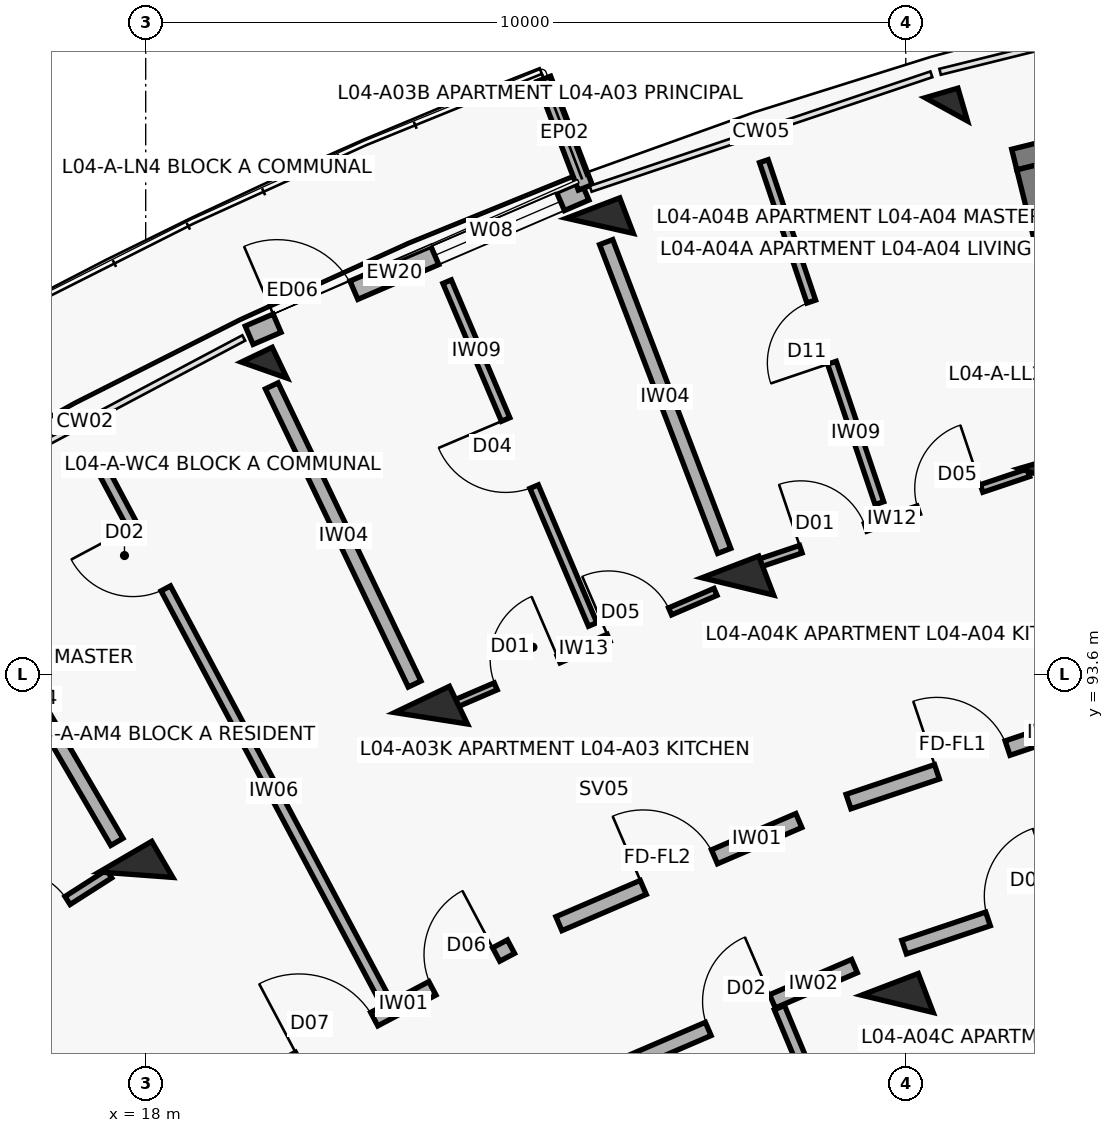
"""IFC4 building model, lengths in metres.
Left out: names, types, materials, properties, quantities, classifications, styles, units other than length and angle.
Written with IfcOpenShell. Run it as: python <this file> out.ifc"""

import sys

from ifc_helpers import new_model, si_unit, direction, frame, frame_2d, origin, origin_2d, place, context, subcontext, project, spatial, rectangle, extrude, element, fill, save


model = new_model("IFC4")
c1 = context("Model", 3, precision=1e-05, world=origin(), true_north=direction((0.0, 1.0)))
c2 = subcontext(c1, "Body", "Model", "MODEL_VIEW")
j1 = project(units=[si_unit("LENGTHUNIT", "METRE"), si_unit("PLANEANGLEUNIT", "RADIAN")], contexts=[c1])
p1 = place(None, origin())
s1 = spatial("IfcSite", under=j1, at=p1, CompositionType="ELEMENT")
p2 = place(p1, origin())
s2 = spatial("IfcBuilding", under=s1, at=p2, CompositionType="ELEMENT")
p3 = place(p2, frame((0.0, 0.0, 14.3)))
s3 = spatial("IfcBuildingStorey", under=s2, at=p3, CompositionType="ELEMENT", Elevation=14.3)
for number, where, z_axis, x_axis in (
    (1, (17.873, 90.96, 0.0), (0.0, 0.0, 1.0), (-0.504, 0.864, 0.0)),
    (2, (21.754, 93.019, 0.0), (0.0, 0.0, 1.0), (-0.432, 0.902, 0.0)),
):
    element("IfcColumn", number, at=place(p3, frame(where, z_axis=z_axis, x_axis=x_axis)), inside=s3, PredefinedType="COLUMN", context=c2, shape_type="SweptSolid", body=[
        extrude(rectangle(XDim=0.55, YDim=0.8, at=origin_2d()), origin(), (0.0, 0.0, 1.0), 3.1),
    ])
p4 = place(p3, frame((19.559, 97.6, 0.0), z_axis=(0.0, 0.0, 1.0), x_axis=(-0.432085748802, 0.901832526405, 0.0)))
e3 = element("IfcColumn", 3, at=p4, inside=s3, PredefinedType="COLUMN", context=c2, shape_type="SweptSolid", body=[
    extrude(rectangle(XDim=0.45, YDim=0.45, at=origin_2d()), origin(), (0.0, 0.0, 1.0), 3.1),
])
for number, where, z_axis, x_axis in (
    (4, (27.889, 89.261, 0.0), (0.0, 0.0, 1.0), (-0.357, 0.934, 0.0)),
    (5, (25.79, 94.753, 0.0), (0.0, 0.0, 1.0), (-0.357, 0.934, 0.0)),
):
    element("IfcColumn", number, at=place(p3, frame(where, z_axis=z_axis, x_axis=x_axis)), inside=s3, PredefinedType="COLUMN", context=c2, shape_type="SweptSolid", body=[
        extrude(rectangle(XDim=0.55, YDim=0.8, at=origin_2d()), origin(), (0.0, 0.0, 1.0), 3.1),
    ])
p5 = place(p3, frame((23.976, 99.499, 0.0), z_axis=(0.0, 0.0, 1.0), x_axis=(-0.357064076459, 0.934079892355, 0.0)))
e6 = element("IfcColumn", 6, at=p5, inside=s3, PredefinedType="COLUMN", context=c2, shape_type="SweptSolid", body=[
    extrude(rectangle(XDim=0.5, YDim=0.75, at=origin_2d()), origin(), (0.0, 0.0, 1.0), 3.1),
])
p6 = place(p3, frame((29.954, 96.153, 0.0), z_axis=(0.0, 0.0, 1.0), x_axis=(-0.27966144946, 0.96009867914, 0.0)))
e7 = element("IfcColumn", 7, at=p6, inside=s3, PredefinedType="COLUMN", context=c2, shape_type="SweptSolid", body=[
    extrude(rectangle(XDim=0.55, YDim=0.8, at=origin_2d()), origin(), (0.0, 0.0, 1.0), 3.1),
])
p7 = place(p3, frame((28.533, 101.031, 0.0), z_axis=(0.0, 0.0, 1.0), x_axis=(-0.27966144946, 0.96009867914, 0.0)))
e8 = element("IfcColumn", 8, at=p7, inside=s3, PredefinedType="COLUMN", context=c2, shape_type="SweptSolid", body=[
    extrude(rectangle(XDim=0.45, YDim=0.45, at=origin_2d()), origin(), (0.0, 0.0, 1.0), 3.1),
])
p8 = place(p3, frame((19.361, 98.059, 0.0), z_axis=(0.0, 0.0, 1.0), x_axis=(0.918711189033, 0.394930058548, 0.0)))
e9 = element("IfcWall", 9, at=p8, inside=s3, PredefinedType="SOLIDWALL", context=c2, shape_type="SweptSolid", body=[
    extrude(rectangle(XDim=4.809, YDim=0.262, at=frame_2d((2.404, 0.0))), origin(), (0.0, 0.0, 1.0), 2.25),
])
p9 = place(p8, frame((0.4, 0.0, 0.0)))
e10 = element("IfcOpeningElement", 10, at=p9, cuts=e9, PredefinedType="OPENING", context=c2, shape_type="SweptSolid", body=[
    extrude(rectangle(XDim=1.1, YDim=2.15, at=frame_2d((0.55, 1.075))), frame((0.0, 0.141, 0.0), z_axis=(0.0, -1.0, 0.0), x_axis=(1.0, 0.0, 0.0)), (0.0, 0.0, 1.0), 0.282),
])
p10 = place(p8, frame((2.659, 0.0, 0.35)))
e11 = element("IfcOpeningElement", 11, at=p10, cuts=e9, PredefinedType="OPENING", context=c2, shape_type="SweptSolid", body=[
    extrude(rectangle(XDim=1.8, YDim=1.65, at=frame_2d((0.9, 0.825))), frame((0.0, 0.141, 0.0), z_axis=(0.0, -1.0, 0.0), x_axis=(1.0, 0.0, 0.0)), (0.0, 0.0, 1.0), 0.282),
])
p11 = place(p3, frame((23.783, 100.003, 0.0), z_axis=(0.0, 0.0, 1.0), x_axis=(-0.356957296461, 0.934120703391, 0.0)))
e12 = element("IfcWall", 12, at=p11, inside=s3, PredefinedType="PARAPET", context=c2, shape_type="SweptSolid", body=[
    extrude(rectangle(XDim=1.53, YDim=0.195, at=frame_2d((0.765, 0.0))), origin(), (0.0, 0.0, 1.0), 2.25),
])
p12 = place(p3, frame((32.718, 101.185, 0.0), z_axis=(0.0, 0.0, 1.0), x_axis=(-0.970711699588, -0.240247364777, 0.0)))
e13 = element("IfcWall", 13, at=p12, inside=s3, PredefinedType="SHEAR", context=c2, shape_type="SweptSolid", body=[
    extrude(rectangle(XDim=3.39, YDim=0.28, at=frame_2d((1.695, 0.0))), origin(), (0.0, 0.0, 1.0), 3.1),
])
p13 = place(p3, frame((30.085, 98.297, 0.0), z_axis=(0.0, 0.0, 1.0), x_axis=(-0.2402993748, 0.970698825832, 0.0)))
e14 = element("IfcWall", 14, at=p13, inside=s3, PredefinedType="SHEAR", context=c2, shape_type="SweptSolid", body=[
    extrude(rectangle(XDim=2.03, YDim=0.28, at=frame_2d((1.015, 0.0))), origin(), (0.0, 0.0, 1.0), 3.1),
])
p14 = place(p3, frame((14.311, 88.917, 0.0), z_axis=(0.0, 0.0, 1.0), x_axis=(0.842238809758, 0.53910461632, 0.0)))
e15 = element("IfcWall", 15, at=p14, inside=s3, PredefinedType="PARTITIONING", context=c2, shape_type="SweptSolid", body=[
    extrude(rectangle(XDim=3.81, YDim=0.125, at=frame_2d((1.905, 0.0))), origin(), (0.0, 0.0, 1.0), 2.08),
])
p15 = place(p14, frame((0.65, 0.0, 0.0)))
e16 = element("IfcOpeningElement", 16, at=p15, cuts=e15, PredefinedType="OPENING", context=c2, shape_type="SweptSolid", body=[
    extrude(rectangle(XDim=0.9, YDim=2.1, at=frame_2d((0.45, 1.05))), frame((0.0, 0.073, 0.0), z_axis=(0.0, -1.0, 0.0), x_axis=(1.0, 0.0, 0.0)), (0.0, 0.0, 1.0), 0.145),
])
p16 = place(p14, frame((2.28, 0.0, 0.0)))
e17 = element("IfcOpeningElement", 17, at=p16, cuts=e15, PredefinedType="OPENING", context=c2, shape_type="SweptSolid", body=[
    extrude(rectangle(XDim=0.88, YDim=2.1, at=frame_2d((0.44, 1.05))), frame((0.0, 0.073, 0.0), z_axis=(0.0, -1.0, 0.0), x_axis=(1.0, 0.0, 0.0)), (0.0, 0.0, 1.0), 0.145),
])
p17 = place(p3, frame((19.77, 88.404, 0.0), z_axis=(0.0, 0.0, 1.0), x_axis=(0.883410853063, 0.468599258099, 0.0)))
e18 = element("IfcWall", 18, at=p17, inside=s3, PredefinedType="SOLIDWALL", context=c2, shape_type="SweptSolid", body=[
    extrude(rectangle(XDim=3.436, YDim=0.2, at=frame_2d((1.718, 0.0))), origin(), (0.0, 0.0, 1.0), 2.08),
])
p18 = place(p17, frame((0.28, 0.0, 0.0)))
e19 = element("IfcOpeningElement", 19, at=p18, cuts=e18, PredefinedType="OPENING", context=c2, shape_type="SweptSolid", body=[
    extrude(rectangle(XDim=1.12, YDim=2.15, at=frame_2d((0.56, 1.075))), frame((0.0, 0.11, 0.0), z_axis=(0.0, -1.0, 0.0), x_axis=(1.0, 0.0, 0.0)), (0.0, 0.0, 1.0), 0.22),
])
p19 = place(p17, frame((2.266, 0.0, 0.0)))
e20 = element("IfcOpeningElement", 20, at=p19, cuts=e18, PredefinedType="OPENING", context=c2, shape_type="SweptSolid", body=[
    extrude(rectangle(XDim=0.95, YDim=2.1, at=frame_2d((0.475, 1.05))), frame((0.0, 0.11, 0.0), z_axis=(0.0, -1.0, 0.0), x_axis=(1.0, 0.0, 0.0)), (0.0, 0.0, 1.0), 0.22),
])
p20 = place(p3, frame((21.107, 89.387, 0.0), z_axis=(0.0, 0.0, 1.0), x_axis=(-0.469891538074, 0.882724159886, 0.0)))
e21 = element("IfcWall", 21, at=p20, inside=s3, PredefinedType="PARTITIONING", context=c2, shape_type="SweptSolid", body=[
    extrude(rectangle(XDim=7.95, YDim=0.14, at=frame_2d((3.975, 0.0))), origin(), (0.0, 0.0, 1.0), 2.08),
])
p21 = place(p20, frame((6.05, 0.0, 0.0)))
e22 = element("IfcOpeningElement", 22, at=p21, cuts=e21, PredefinedType="OPENING", context=c2, shape_type="SweptSolid", body=[
    extrude(rectangle(XDim=0.92, YDim=2.1, at=frame_2d((0.46, 1.05))), frame((0.0, 0.08, 0.0), z_axis=(0.0, -1.0, 0.0), x_axis=(1.0, 0.0, 0.0)), (0.0, 0.0, 1.0), 0.16),
])
p22 = place(p3, frame((17.621, 91.392, 0.0), z_axis=(0.0, 0.0, 1.0), x_axis=(-0.504216452091, 0.863577309475, 0.0)))
e23 = element("IfcWall", 23, at=p22, inside=s3, PredefinedType="SOLIDWALL", context=c2, shape_type="SweptSolid", body=[
    extrude(rectangle(XDim=4.35, YDim=0.185, at=frame_2d((2.175, 0.0))), origin(), (0.0, 0.0, 1.0), 2.08),
])
p23 = place(p3, frame((23.437, 90.316, 0.0), z_axis=(0.0, 0.0, 1.0), x_axis=(0.918718172399, 0.394913813008, 0.0)))
e24 = element("IfcWall", 24, at=p23, inside=s3, PredefinedType="SOLIDWALL", context=c2, shape_type="SweptSolid", body=[
    extrude(rectangle(XDim=3.436, YDim=0.2, at=frame_2d((1.718, 0.0))), origin(), (0.0, 0.0, 1.0), 2.08),
])
p24 = place(p23, frame((1.208, 0.0, 0.0)))
e25 = element("IfcOpeningElement", 25, at=p24, cuts=e24, PredefinedType="OPENING", context=c2, shape_type="SweptSolid", body=[
    extrude(rectangle(XDim=1.02, YDim=2.15, at=frame_2d((0.51, 1.075))), frame((0.0, 0.11, 0.0), z_axis=(0.0, -1.0, 0.0), x_axis=(1.0, 0.0, 0.0)), (0.0, 0.0, 1.0), 0.22),
])
p25 = place(p3, frame((24.322, 88.467, 0.0), z_axis=(0.0, 0.0, 1.0), x_axis=(0.918723391052, 0.394901672235, 0.0)))
e26 = element("IfcWall", 26, at=p25, inside=s3, PredefinedType="SOLIDWALL", context=c2, shape_type="SweptSolid", body=[
    extrude(rectangle(XDim=3.269, YDim=0.19, at=frame_2d((1.634, 0.0))), origin(), (0.0, 0.0, 1.0), 2.08),
])
p26 = place(p25, frame((1.174, 0.0, 0.0)))
e27 = element("IfcOpeningElement", 27, at=p26, cuts=e26, PredefinedType="OPENING", context=c2, shape_type="SweptSolid", body=[
    extrude(rectangle(XDim=0.92, YDim=2.1, at=frame_2d((0.46, 1.05))), frame((0.0, 0.105, 0.0), z_axis=(0.0, -1.0, 0.0), x_axis=(1.0, 0.0, 0.0)), (0.0, 0.0, 1.0), 0.21),
])
p27 = place(p3, frame((27.609, 86.166, 0.0), z_axis=(0.0, 0.0, 1.0), x_axis=(-0.385151143297, 0.922853507777, 0.0)))
e28 = element("IfcWall", 28, at=p27, inside=s3, PredefinedType="PARTITIONING", context=c2, shape_type="SweptSolid", body=[
    extrude(rectangle(XDim=3.3, YDim=0.145, at=frame_2d((1.65, 0.0))), origin(), (0.0, 0.0, 1.0), 2.08),
])
p28 = place(p27, frame((1.21, 0.0, 0.0)))
e29 = element("IfcOpeningElement", 29, at=p28, cuts=e28, PredefinedType="OPENING", context=c2, shape_type="SweptSolid", body=[
    extrude(rectangle(XDim=0.88, YDim=2.1, at=frame_2d((0.44, 1.05))), frame((0.0, 0.083, 0.0), z_axis=(0.0, -1.0, 0.0), x_axis=(1.0, 0.0, 0.0)), (0.0, 0.0, 1.0), 0.165),
])
p29 = place(p3, frame((22.008, 93.182, 0.0), z_axis=(0.0, 0.0, 1.0), x_axis=(0.918732171064, 0.394881245253, 0.0)))
e30 = element("IfcWall", 30, at=p29, inside=s3, PredefinedType="PARTITIONING", context=c2, shape_type="SweptSolid", body=[
    extrude(rectangle(XDim=3.797, YDim=0.1, at=frame_2d((1.899, 0.0))), origin(), (0.0, 0.0, 1.0), 2.08),
])
p30 = place(p29, frame((0.65, 0.0, 0.0)))
e31 = element("IfcOpeningElement", 31, at=p30, cuts=e30, PredefinedType="OPENING", context=c2, shape_type="SweptSolid", body=[
    extrude(rectangle(XDim=0.9, YDim=2.1, at=frame_2d((0.45, 1.05))), frame((0.0, 0.06, 0.0), z_axis=(0.0, -1.0, 0.0), x_axis=(1.0, 0.0, 0.0)), (0.0, 0.0, 1.0), 0.12),
])
p31 = place(p29, frame((2.267, 0.0, 0.0)))
e32 = element("IfcOpeningElement", 32, at=p31, cuts=e30, PredefinedType="OPENING", context=c2, shape_type="SweptSolid", body=[
    extrude(rectangle(XDim=0.88, YDim=2.1, at=frame_2d((0.44, 1.05))), frame((0.0, 0.06, 0.0), z_axis=(0.0, -1.0, 0.0), x_axis=(1.0, 0.0, 0.0)), (0.0, 0.0, 1.0), 0.12),
])
p32 = place(p3, frame((23.88, 94.253, 0.0), z_axis=(0.0, 0.0, 1.0), x_axis=(-0.39076607415, 0.920490019116, 0.0)))
e33 = element("IfcWall", 33, at=p32, inside=s3, PredefinedType="PARTITIONING", context=c2, shape_type="SweptSolid", body=[
    extrude(rectangle(XDim=4.9, YDim=0.12, at=frame_2d((2.45, 0.0))), origin(), (0.0, 0.0, 1.0), 2.08),
])
p33 = place(p32, frame((1.97, 0.0, 0.0)))
e34 = element("IfcOpeningElement", 34, at=p33, cuts=e33, PredefinedType="OPENING", context=c2, shape_type="SweptSolid", body=[
    extrude(rectangle(XDim=0.96, YDim=2.1, at=frame_2d((0.48, 1.05))), frame((0.0, 0.07, 0.0), z_axis=(0.0, -1.0, 0.0), x_axis=(1.0, 0.0, 0.0)), (0.0, 0.0, 1.0), 0.14),
])
p34 = place(p3, frame((21.538, 93.469, 0.0), z_axis=(0.0, 0.0, 1.0), x_axis=(-0.432086898897, 0.901831975371, 0.0)))
e35 = element("IfcWall", 35, at=p34, inside=s3, PredefinedType="SOLIDWALL", context=c2, shape_type="SweptSolid", body=[
    extrude(rectangle(XDim=4.35, YDim=0.185, at=frame_2d((2.175, 0.0))), origin(), (0.0, 0.0, 1.0), 2.08),
])
p35 = place(p3, frame((27.247, 91.923, 0.0), z_axis=(0.0, 0.0, 1.0), x_axis=(0.947863007629, 0.318678080151, 0.0)))
e36 = element("IfcWall", 36, at=p35, inside=s3, PredefinedType="SOLIDWALL", context=c2, shape_type="SweptSolid", body=[
    extrude(rectangle(XDim=3.436, YDim=0.2, at=frame_2d((1.718, 0.0))), origin(), (0.0, 0.0, 1.0), 2.08),
])
p36 = place(p35, frame((1.228, 0.0, 0.0)))
e37 = element("IfcOpeningElement", 37, at=p36, cuts=e36, PredefinedType="OPENING", context=c2, shape_type="SweptSolid", body=[
    extrude(rectangle(XDim=0.98, YDim=2.15, at=frame_2d((0.49, 1.075))), frame((0.0, 0.11, 0.0), z_axis=(0.0, -1.0, 0.0), x_axis=(1.0, 0.0, 0.0)), (0.0, 0.0, 1.0), 0.22),
])
p37 = place(p3, frame((27.979, 90.008, 0.0), z_axis=(0.0, 0.0, 1.0), x_axis=(0.94787351033, 0.318646839643, 0.0)))
e38 = element("IfcWall", 38, at=p37, inside=s3, PredefinedType="SOLIDWALL", context=c2, shape_type="SweptSolid", body=[
    extrude(rectangle(XDim=3.269, YDim=0.19, at=frame_2d((1.634, 0.0))), origin(), (0.0, 0.0, 1.0), 2.08),
])
p38 = place(p37, frame((1.164, 0.0, 0.0)))
e39 = element("IfcOpeningElement", 39, at=p38, cuts=e38, PredefinedType="OPENING", context=c2, shape_type="SweptSolid", body=[
    extrude(rectangle(XDim=0.94, YDim=2.1, at=frame_2d((0.47, 1.05))), frame((0.0, 0.105, 0.0), z_axis=(0.0, -1.0, 0.0), x_axis=(1.0, 0.0, 0.0)), (0.0, 0.0, 1.0), 0.21),
])
p39 = place(p3, frame((26.003, 95.036, 0.0), z_axis=(0.0, 0.0, 1.0), x_axis=(0.947879193428, 0.318629933725, 0.0)))
e40 = element("IfcWall", 40, at=p39, inside=s3, PredefinedType="PARTITIONING", context=c2, shape_type="SweptSolid", body=[
    extrude(rectangle(XDim=3.81, YDim=0.105, at=frame_2d((1.905, 0.0))), origin(), (0.0, 0.0, 1.0), 2.08),
])
p40 = place(p39, frame((0.65, 0.0, 0.0)))
e41 = element("IfcOpeningElement", 41, at=p40, cuts=e40, PredefinedType="OPENING", context=c2, shape_type="SweptSolid", body=[
    extrude(rectangle(XDim=0.9, YDim=2.1, at=frame_2d((0.45, 1.05))), frame((0.0, 0.062, 0.0), z_axis=(0.0, -1.0, 0.0), x_axis=(1.0, 0.0, 0.0)), (0.0, 0.0, 1.0), 0.125),
])
p41 = place(p39, frame((2.28, 0.0, 0.0)))
e42 = element("IfcOpeningElement", 42, at=p41, cuts=e40, PredefinedType="OPENING", context=c2, shape_type="SweptSolid", body=[
    extrude(rectangle(XDim=0.88, YDim=2.1, at=frame_2d((0.44, 1.05))), frame((0.0, 0.062, 0.0), z_axis=(0.0, -1.0, 0.0), x_axis=(1.0, 0.0, 0.0)), (0.0, 0.0, 1.0), 0.125),
])
p42 = place(p3, frame((27.653, 95.849, 0.0), z_axis=(0.0, 0.0, 1.0), x_axis=(-0.320049134076, 0.947400945628, 0.0)))
e43 = element("IfcWall", 43, at=p42, inside=s3, PredefinedType="PARTITIONING", context=c2, shape_type="SweptSolid", body=[
    extrude(rectangle(XDim=4.75, YDim=0.12, at=frame_2d((2.375, 0.0))), origin(), (0.0, 0.0, 1.0), 2.08),
])
p43 = place(p42, frame((1.95, 0.0, 0.0)))
e44 = element("IfcOpeningElement", 44, at=p43, cuts=e43, PredefinedType="OPENING", context=c2, shape_type="SweptSolid", body=[
    extrude(rectangle(XDim=0.85, YDim=2.1, at=frame_2d((0.425, 1.05))), frame((0.0, 0.07, 0.0), z_axis=(0.0, -1.0, 0.0), x_axis=(1.0, 0.0, 0.0)), (0.0, 0.0, 1.0), 0.14),
])
p44 = place(p3, frame((25.611, 95.22, 0.0), z_axis=(0.0, 0.0, 1.0), x_axis=(-0.357064016205, 0.934079915388, 0.0)))
e45 = element("IfcWall", 45, at=p44, inside=s3, PredefinedType="SOLIDWALL", context=c2, shape_type="SweptSolid", body=[
    extrude(rectangle(XDim=4.35, YDim=0.185, at=frame_2d((2.175, 0.0))), origin(), (0.0, 0.0, 1.0), 2.08),
])
p45 = place(p9, origin())
e46 = element("IfcDoor", 46, at=p45, inside=s3, OperationType="SINGLE_SWING_LEFT", PredefinedType="DOOR", context=c2, shape_type="SweptSolid", body=[
    extrude(rectangle(XDim=1.1, YDim=2.15, at=frame_2d((0.55, 1.075))), frame((0.0, 0.025, 0.0), z_axis=(0.0, -1.0, 0.0), x_axis=(1.0, 0.0, 0.0)), (0.0, 0.0, 1.0), 0.05),
])
fill(e10, e46)
p46 = place(p10, origin())
e47 = element("IfcWindow", 47, at=p46, inside=s3, PartitioningType="TRIPLE_PANEL_VERTICAL", PredefinedType="WINDOW", context=c2, shape_type="SweptSolid", body=[
    extrude(rectangle(XDim=1.8, YDim=1.65, at=frame_2d((0.9, 0.825))), frame((0.0, 0.03, 0.0), z_axis=(0.0, -1.0, 0.0), x_axis=(1.0, 0.0, 0.0)), (0.0, 0.0, 1.0), 0.06),
])
fill(e11, e47)
p47 = place(p16, origin())
e48 = element("IfcDoor", 48, at=p47, inside=s3, OperationType="SINGLE_SWING_LEFT", PredefinedType="DOOR", context=c2, shape_type="SweptSolid", body=[
    extrude(rectangle(XDim=0.88, YDim=2.1, at=frame_2d((0.44, 1.05))), frame((0.0, 0.025, 0.0), z_axis=(0.0, -1.0, 0.0), x_axis=(1.0, 0.0, 0.0)), (0.0, 0.0, 1.0), 0.05),
])
fill(e17, e48)
p48 = place(p18, origin())
e49 = element("IfcDoor", 49, at=p48, inside=s3, OperationType="SINGLE_SWING_LEFT", PredefinedType="DOOR", context=c2, shape_type="SweptSolid", body=[
    extrude(rectangle(XDim=1.12, YDim=2.15, at=frame_2d((0.56, 1.075))), frame((0.0, 0.025, 0.0), z_axis=(0.0, -1.0, 0.0), x_axis=(1.0, 0.0, 0.0)), (0.0, 0.0, 1.0), 0.05),
])
fill(e19, e49)
p49 = place(p19, origin())
e50 = element("IfcDoor", 50, at=p49, inside=s3, OperationType="SINGLE_SWING_RIGHT", PredefinedType="DOOR", context=c2, shape_type="SweptSolid", body=[
    extrude(rectangle(XDim=0.95, YDim=2.1, at=frame_2d((0.475, 1.05))), frame((0.0, 0.025, 0.0), z_axis=(0.0, -1.0, 0.0), x_axis=(1.0, 0.0, 0.0)), (0.0, 0.0, 1.0), 0.05),
])
fill(e20, e50)
p50 = place(p21, origin())
e51 = element("IfcDoor", 51, at=p50, inside=s3, OperationType="SINGLE_SWING_RIGHT", PredefinedType="DOOR", context=c2, shape_type="SweptSolid", body=[
    extrude(rectangle(XDim=0.92, YDim=2.1, at=frame_2d((0.46, 1.05))), frame((0.0, 0.025, 0.0), z_axis=(0.0, -1.0, 0.0), x_axis=(1.0, 0.0, 0.0)), (0.0, 0.0, 1.0), 0.05),
])
fill(e22, e51)
p51 = place(p24, origin())
e52 = element("IfcDoor", 52, at=p51, inside=s3, OperationType="SINGLE_SWING_LEFT", PredefinedType="DOOR", context=c2, shape_type="SweptSolid", body=[
    extrude(rectangle(XDim=1.02, YDim=2.15, at=frame_2d((0.51, 1.075))), frame((0.0, 0.025, 0.0), z_axis=(0.0, -1.0, 0.0), x_axis=(1.0, 0.0, 0.0)), (0.0, 0.0, 1.0), 0.05),
])
fill(e25, e52)
p52 = place(p26, origin())
e53 = element("IfcDoor", 53, at=p52, inside=s3, OperationType="SINGLE_SWING_RIGHT", PredefinedType="DOOR", context=c2, shape_type="SweptSolid", body=[
    extrude(rectangle(XDim=0.92, YDim=2.1, at=frame_2d((0.46, 1.05))), frame((0.0, 0.025, 0.0), z_axis=(0.0, -1.0, 0.0), x_axis=(1.0, 0.0, 0.0)), (0.0, 0.0, 1.0), 0.05),
])
fill(e27, e53)
p53 = place(p30, origin())
e54 = element("IfcDoor", 54, at=p53, inside=s3, OperationType="SINGLE_SWING_RIGHT", PredefinedType="DOOR", context=c2, shape_type="SweptSolid", body=[
    extrude(rectangle(XDim=0.9, YDim=2.1, at=frame_2d((0.45, 1.05))), frame((0.0, 0.025, 0.0), z_axis=(0.0, -1.0, 0.0), x_axis=(1.0, 0.0, 0.0)), (0.0, 0.0, 1.0), 0.05),
])
fill(e31, e54)
p54 = place(p31, origin())
e55 = element("IfcDoor", 55, at=p54, inside=s3, OperationType="SINGLE_SWING_LEFT", PredefinedType="DOOR", context=c2, shape_type="SweptSolid", body=[
    extrude(rectangle(XDim=0.88, YDim=2.1, at=frame_2d((0.44, 1.05))), frame((0.0, 0.025, 0.0), z_axis=(0.0, -1.0, 0.0), x_axis=(1.0, 0.0, 0.0)), (0.0, 0.0, 1.0), 0.05),
])
fill(e32, e55)
p55 = place(p33, origin())
e56 = element("IfcDoor", 56, at=p55, inside=s3, OperationType="SINGLE_SWING_RIGHT", PredefinedType="DOOR", context=c2, shape_type="SweptSolid", body=[
    extrude(rectangle(XDim=0.96, YDim=2.1, at=frame_2d((0.48, 1.05))), frame((0.0, 0.025, 0.0), z_axis=(0.0, -1.0, 0.0), x_axis=(1.0, 0.0, 0.0)), (0.0, 0.0, 1.0), 0.05),
])
fill(e34, e56)
p56 = place(p36, origin())
e57 = element("IfcDoor", 57, at=p56, inside=s3, OperationType="SINGLE_SWING_LEFT", PredefinedType="DOOR", context=c2, shape_type="SweptSolid", body=[
    extrude(rectangle(XDim=0.98, YDim=2.15, at=frame_2d((0.49, 1.075))), frame((0.0, 0.025, 0.0), z_axis=(0.0, -1.0, 0.0), x_axis=(1.0, 0.0, 0.0)), (0.0, 0.0, 1.0), 0.05),
])
fill(e37, e57)
p57 = place(p38, origin())
e58 = element("IfcDoor", 58, at=p57, inside=s3, OperationType="SINGLE_SWING_RIGHT", PredefinedType="DOOR", context=c2, shape_type="SweptSolid", body=[
    extrude(rectangle(XDim=0.94, YDim=2.1, at=frame_2d((0.47, 1.05))), frame((0.0, 0.025, 0.0), z_axis=(0.0, -1.0, 0.0), x_axis=(1.0, 0.0, 0.0)), (0.0, 0.0, 1.0), 0.05),
])
fill(e39, e58)
p58 = place(p40, origin())
e59 = element("IfcDoor", 59, at=p58, inside=s3, OperationType="SINGLE_SWING_LEFT", PredefinedType="DOOR", context=c2, shape_type="SweptSolid", body=[
    extrude(rectangle(XDim=0.9, YDim=2.1, at=frame_2d((0.45, 1.05))), frame((0.0, 0.025, 0.0), z_axis=(0.0, -1.0, 0.0), x_axis=(1.0, 0.0, 0.0)), (0.0, 0.0, 1.0), 0.05),
])
fill(e41, e59)
p59 = place(p41, origin())
e60 = element("IfcDoor", 60, at=p59, inside=s3, OperationType="SINGLE_SWING_RIGHT", PredefinedType="DOOR", context=c2, shape_type="SweptSolid", body=[
    extrude(rectangle(XDim=0.88, YDim=2.1, at=frame_2d((0.44, 1.05))), frame((0.0, 0.025, 0.0), z_axis=(0.0, -1.0, 0.0), x_axis=(1.0, 0.0, 0.0)), (0.0, 0.0, 1.0), 0.05),
])
fill(e42, e60)
p60 = place(p43, origin())
e61 = element("IfcDoor", 61, at=p60, inside=s3, OperationType="SINGLE_SWING_LEFT", PredefinedType="DOOR", context=c2, shape_type="SweptSolid", body=[
    extrude(rectangle(XDim=0.85, YDim=2.1, at=frame_2d((0.425, 1.05))), frame((0.0, 0.025, 0.0), z_axis=(0.0, -1.0, 0.0), x_axis=(1.0, 0.0, 0.0)), (0.0, 0.0, 1.0), 0.05),
])
fill(e44, e61)
save(model, sys.argv[1])
